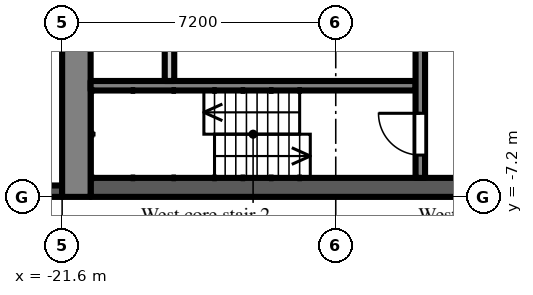
"""IFC4 building model, lengths in metres.
Left out: names, types, materials, properties, quantities, classifications, styles, units other than length and angle.
Written with IfcOpenShell. Run it as: python <this file> out.ifc"""

import sys

from ifc_helpers import new_model, si_unit, direction, frame, frame_2d, origin, place, context, subcontext, project, spatial, rectangle, extrude, element, fill, save


model = new_model("IFC4")
c1 = context("Model", 3, precision=1e-05, world=origin(), true_north=direction((0.0, 1.0)))
c2 = subcontext(c1, "Body", "Model", "MODEL_VIEW")
j1 = project(units=[si_unit("LENGTHUNIT", "METRE"), si_unit("PLANEANGLEUNIT", "RADIAN")], contexts=[c1])
p1 = place(None, origin())
s1 = spatial("IfcSite", under=j1, at=p1, CompositionType="ELEMENT")
p2 = place(p1, origin())
s2 = spatial("IfcBuilding", under=s1, at=p2, CompositionType="ELEMENT")
p3 = place(p2, frame((0.0, 0.0, 75.9)))
s3 = spatial("IfcBuildingStorey", under=s2, at=p3, CompositionType="ELEMENT", Elevation=75.9)
p4 = place(p3, frame((-24.3, -7.05, 0.0), z_axis=(0.0, 0.0, 1.0), x_axis=(1.0, 0.0, 0.0)))
e1 = element("IfcWall", 1, at=p4, inside=s3, PredefinedType="SOLIDWALL", context=c2, shape_type="SweptSolid", body=[
    extrude(rectangle(XDim=2.7, YDim=0.3, at=frame_2d((1.35, 0.0))), origin(), (0.0, 0.0, 1.0), 2.1),
])
p5 = place(p3, frame((-21.225, -7.2, 0.0), z_axis=(0.0, 0.0, 1.0), x_axis=(0.0, 1.0, 0.0)))
e2 = element("IfcWall", 2, at=p5, inside=s3, PredefinedType="SHEAR", context=c2, shape_type="SweptSolid", body=[
    extrude(rectangle(XDim=14.4, YDim=0.75, at=frame_2d((7.2, 0.0))), origin(), (0.0, 0.0, 1.0), 2.575),
])
p6 = place(p5, frame((6.0, 0.0, 0.0)))
e3 = element("IfcOpeningElement", 3, at=p6, cuts=e2, PredefinedType="OPENING", context=c2, shape_type="SweptSolid", body=[
    extrude(rectangle(XDim=2.4, YDim=2.2, at=frame_2d((1.2, 1.1))), frame((0.0, 0.385, 0.0), z_axis=(0.0, -1.0, 0.0), x_axis=(1.0, 0.0, 0.0)), (0.0, 0.0, 1.0), 0.77),
])
p7 = place(p3, frame((-7.9, -6.95, 0.0), z_axis=(0.0, 0.0, 1.0), x_axis=(-1.0, 0.0, 0.0)))
e4 = element("IfcWall", 4, at=p7, inside=s3, PredefinedType="SHEAR", context=c2, shape_type="SweptSolid", body=[
    extrude(rectangle(XDim=12.95, YDim=0.5, at=frame_2d((6.475, 0.0))), origin(), (0.0, 0.0, 1.0), 2.575),
])
p8 = place(p3, frame((-12.3, -4.275, 0.0), z_axis=(0.0, 0.0, 1.0), x_axis=(-1.0, 0.0, 0.0)))
e5 = element("IfcWall", 5, at=p8, inside=s3, PredefinedType="SHEAR", context=c2, shape_type="SweptSolid", body=[
    extrude(rectangle(XDim=8.55, YDim=0.25, at=frame_2d((4.275, 0.0))), origin(), (0.0, 0.0, 1.0), 2.575),
])
p9 = place(p3, frame((-12.175, -2.05, 0.0), z_axis=(0.0, 0.0, 1.0), x_axis=(0.0, -1.0, 0.0)))
e6 = element("IfcWall", 6, at=p9, inside=s3, PredefinedType="SHEAR", context=c2, shape_type="SweptSolid", body=[
    extrude(rectangle(XDim=4.65, YDim=0.25, at=frame_2d((2.325, 0.0))), origin(), (0.0, 0.0, 1.0), 2.575),
])
p10 = place(p9, frame((2.95, 0.0, 0.0)))
e7 = element("IfcOpeningElement", 7, at=p10, cuts=e6, PredefinedType="OPENING", context=c2, shape_type="SweptSolid", body=[
    extrude(rectangle(XDim=1.1, YDim=2.1, at=frame_2d((0.55, 1.05))), frame((0.0, 0.135, 0.0), z_axis=(0.0, -1.0, 0.0), x_axis=(1.0, 0.0, 0.0)), (0.0, 0.0, 1.0), 0.27),
])
p11 = place(p3, frame((-18.775, -2.05, 0.0), z_axis=(0.0, 0.0, 1.0), x_axis=(0.0, -1.0, 0.0)))
e8 = element("IfcWall", 8, at=p11, inside=s3, PredefinedType="PARTITIONING", context=c2, shape_type="SweptSolid", body=[
    extrude(rectangle(XDim=2.1, YDim=0.25, at=frame_2d((1.05, 0.0))), origin(), (0.0, 0.0, 1.0), 2.575),
])
p12 = place(p10, frame((1.1, 0.0, 0.0), z_axis=(0.0, 0.0, 1.0), x_axis=(-1.0, 0.0, 0.0)))
e9 = element("IfcDoor", 9, at=p12, inside=s3, OperationType="SINGLE_SWING_RIGHT", PredefinedType="DOOR", context=c2, shape_type="SweptSolid", body=[
    extrude(rectangle(XDim=1.1, YDim=2.1, at=frame_2d((0.55, 1.05))), frame((0.0, 0.025, 0.0), z_axis=(0.0, -1.0, 0.0), x_axis=(1.0, 0.0, 0.0)), (0.0, 0.0, 1.0), 0.05),
])
fill(e7, e9)
save(model, sys.argv[1])
